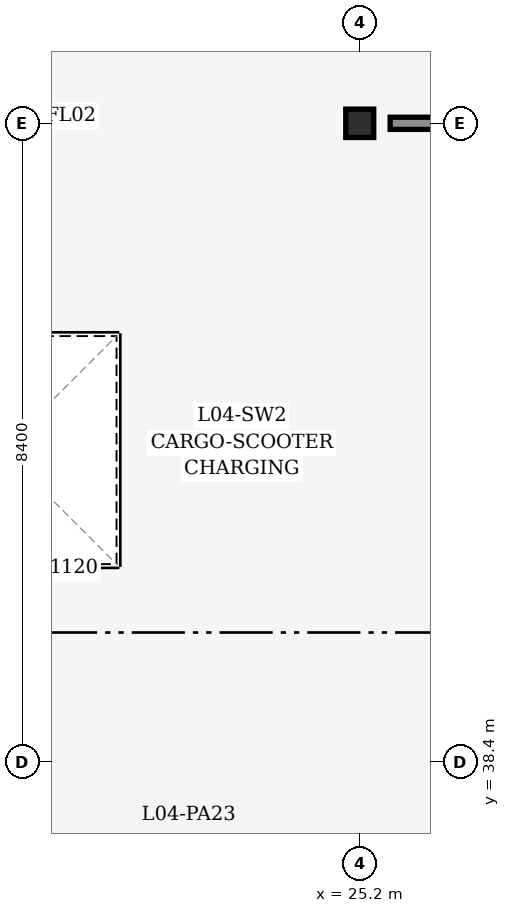
"""IFC4 building model, lengths in metres.
Left out: names, types, materials, properties, quantities, classifications, styles, units other than length and angle.
Written with IfcOpenShell. Run it as: python <this file> out.ifc"""

import sys

from ifc_helpers import new_model, si_unit, direction, frame, frame_2d, origin, origin_2d, place, context, subcontext, project, spatial, rectangle, i_section, extrude, element, save


model = new_model("IFC4")
c1 = context("Model", 3, precision=1e-05, world=origin(), true_north=direction((0.0, 1.0)))
c2 = subcontext(c1, "Body", "Model", "MODEL_VIEW")
j1 = project(units=[si_unit("LENGTHUNIT", "METRE"), si_unit("PLANEANGLEUNIT", "RADIAN")], contexts=[c1])
p1 = place(None, origin())
s1 = spatial("IfcSite", under=j1, at=p1, CompositionType="ELEMENT")
p2 = place(p1, origin())
s2 = spatial("IfcBuilding", under=s1, at=p2, CompositionType="ELEMENT")
p3 = place(p2, frame((0.0, 0.0, 16.2)))
s3 = spatial("IfcBuildingStorey", under=s2, at=p3, CompositionType="ELEMENT", Elevation=16.2)
for number, where, z_axis, x_axis in (
    (1, (25.2, 38.4, 0.0), (0.0, 0.0, 1.0), (1.0, 0.0, 0.0)),
    (2, (25.2, 46.8, 0.0), (0.0, 0.0, 1.0), (1.0, 0.0, 0.0)),
):
    element("IfcColumn", number, at=place(p3, frame(where, z_axis=z_axis, x_axis=x_axis)), inside=s3, PredefinedType="COLUMN", context=c2, shape_type="SweptSolid", body=[
        extrude(i_section(OverallWidth=0.373, OverallDepth=0.368, WebThickness=0.014, FlangeThickness=0.024, FilletRadius=0.015, at=origin_2d()), origin(), (0.0, 0.0, 1.0), 3.6),
    ])
p4 = place(p3, frame((25.6, 46.8, 0.0), z_axis=(0.0, 0.0, 1.0), x_axis=(1.0, 0.0, 0.0)))
e3 = element("IfcWall", 3, at=p4, inside=s3, PredefinedType="PARTITIONING", context=c2, shape_type="SweptSolid", body=[
    extrude(rectangle(XDim=32.8, YDim=0.16, at=frame_2d((16.4, 0.0))), origin(), (0.0, 0.0, 1.0), 2.525),
])
p5 = place(p4, frame((4.0, 0.0, 0.0)))
e4 = element("IfcOpeningElement", 4, at=p5, cuts=e3, PredefinedType="OPENING", context=c2, shape_type="SweptSolid", body=[
    extrude(rectangle(XDim=1.2, YDim=2.15, at=frame_2d((0.6, 1.075))), frame((0.0, 0.09, 0.0), z_axis=(0.0, -1.0, 0.0), x_axis=(1.0, 0.0, 0.0)), (0.0, 0.0, 1.0), 0.18),
])
save(model, sys.argv[1])
